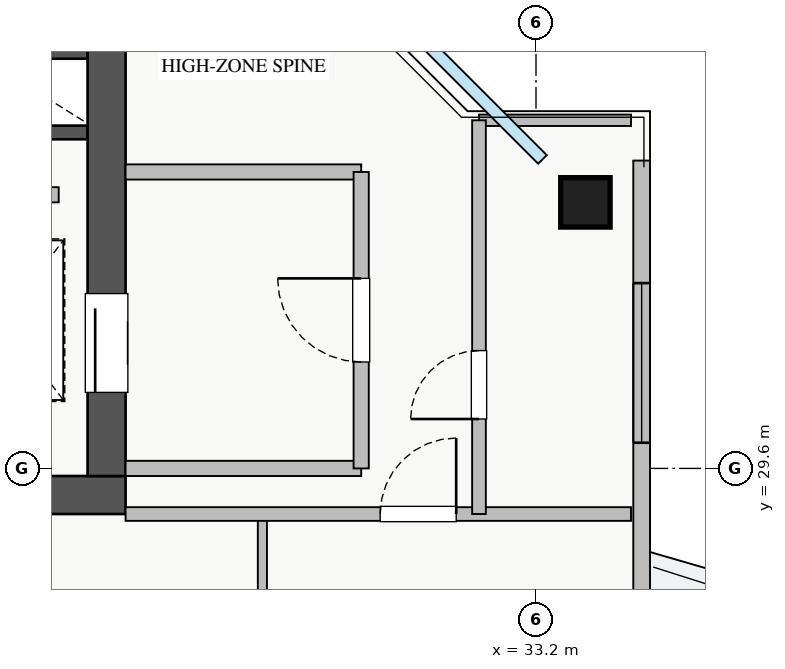
"""IFC4 building model, lengths in metres.
Left out: names, types, materials, properties, quantities, classifications, styles, units other than length and angle.
Written with IfcOpenShell. Run it as: python <this file> out.ifc"""

import sys

from ifc_helpers import new_model, si_unit, direction, frame, frame_2d, origin, origin_2d, place, context, subcontext, project, spatial, rectangle, extrude, source, transform, mapped, element, fill, save


model = new_model("IFC4")
c1 = context("Model", 3, precision=1e-05, world=origin(), true_north=direction((0.0, 1.0)))
c2 = subcontext(c1, "Body", "Model", "MODEL_VIEW")
j1 = project(units=[si_unit("LENGTHUNIT", "METRE"), si_unit("PLANEANGLEUNIT", "RADIAN")], contexts=[c1])
p1 = place(None, origin())
s1 = spatial("IfcSite", under=j1, at=p1, CompositionType="ELEMENT")
p2 = place(p1, origin())
s2 = spatial("IfcBuilding", under=s1, at=p2, CompositionType="ELEMENT")
p3 = place(p2, frame((0.0, 0.0, 250.25)))
s3 = spatial("IfcBuildingStorey", under=s2, at=p3, CompositionType="ELEMENT", Elevation=250.25)
for number, where, z_axis, x_axis in (
    (1, (25.8, 35.08, 0.0), (0.0, 0.0, 1.0), (1.0, 0.0, 0.0)),
    (2, (25.8, 34.02, 0.0), (0.0, 0.0, 1.0), (1.0, 0.0, 0.0)),
):
    element("IfcWall", number, at=place(p3, frame(where, z_axis=z_axis, x_axis=x_axis)), inside=s3, PredefinedType="SHEAR", context=c2, shape_type="SweptSolid", body=[
        extrude(rectangle(XDim=1.5, YDim=0.18, at=frame_2d((0.75, 0.0))), origin(), (0.0, 0.0, 1.0), 3.07),
    ])
p4 = place(p3, frame((10.2, 29.25, 0.0), z_axis=(0.0, 0.0, 1.0), x_axis=(1.0, 0.0, 0.0)))
e3 = element("IfcWall", 3, at=p4, inside=s3, PredefinedType="SHEAR", context=c2, shape_type="SweptSolid", body=[
    extrude(rectangle(XDim=17.6, YDim=0.5, at=frame_2d((8.8, 0.0))), origin(), (0.0, 0.0, 1.0), 3.25),
])
p5 = place(p3, frame((27.55, 29.5, 0.0), z_axis=(0.0, 0.0, 1.0), x_axis=(0.0, 1.0, 0.0)))
e4 = element("IfcWall", 4, at=p5, inside=s3, PredefinedType="SHEAR", context=c2, shape_type="SweptSolid", body=[
    extrude(rectangle(XDim=6.2, YDim=0.5, at=frame_2d((3.1, 0.0))), origin(), (0.0, 0.0, 1.0), 3.25),
])
p6 = place(p5, frame((1.1, 0.0, 0.0)))
e5 = element("IfcOpeningElement", 5, at=p6, cuts=e4, PredefinedType="OPENING", context=c2, shape_type="SweptSolid", body=[
    extrude(rectangle(XDim=1.3, YDim=2.05, at=frame_2d((0.65, 1.025))), frame((0.0, 0.26, 0.0), z_axis=(0.0, -1.0, 0.0), x_axis=(1.0, 0.0, 0.0)), (0.0, 0.0, 1.0), 0.52),
])
m1 = source(origin(), c2, "Body", "SweptSolid", [
    extrude(rectangle(XDim=0.65, YDim=0.65, at=origin_2d()), origin(), (0.0, 0.0, 1.0), 3.25),
])
p7 = place(p3, frame((33.85, 33.1, 0.0), z_axis=(0.0, 0.0, 1.0), x_axis=(1.0, 0.0, 0.0)))
e6 = element("IfcColumn", 6, at=p7, inside=s3, PredefinedType="COLUMN", context=c2, shape_type="MappedRepresentation", body=[
    mapped(m1, transform((0.0, 0.0, 0.0), x_axis=(1.0, 0.0, 0.0), y_axis=(0.0, 1.0, 0.0), z_axis=(0.0, 0.0, 1.0), scale=1.0)),
])
p8 = place(p3, frame((34.59, 12.35, 0.0), z_axis=(0.0, 0.0, 1.0), x_axis=(0.0, 1.0, 0.0)))
e7 = element("IfcWall", 7, at=p8, inside=s3, PredefinedType="STANDARD", context=c2, shape_type="SweptSolid", body=[
    extrude(rectangle(XDim=21.3, YDim=0.22, at=frame_2d((10.65, 0.0))), origin(), (0.0, 0.0, 1.0), 2.61),
])
p9 = place(p8, frame((11.5, 0.0, 0.0)))
e8 = element("IfcOpeningElement", 8, at=p9, cuts=e7, PredefinedType="OPENING", context=c2, shape_type="SweptSolid", body=[
    extrude(rectangle(XDim=1.2, YDim=2.1, at=frame_2d((0.6, 1.05))), frame((0.0, 0.12, 0.0), z_axis=(0.0, -1.0, 0.0), x_axis=(1.0, 0.0, 0.0)), (0.0, 0.0, 1.0), 0.24),
])
p10 = place(p8, frame((1.463, 0.0, 0.9)))
e9 = element("IfcOpeningElement", 9, at=p10, cuts=e7, PredefinedType="OPENING", context=c2, shape_type="SweptSolid", body=[
    extrude(rectangle(XDim=2.4, YDim=1.48, at=frame_2d((1.2, 0.74))), frame((0.0, 0.12, 0.0), z_axis=(0.0, -1.0, 0.0), x_axis=(1.0, 0.0, 0.0)), (0.0, 0.0, 1.0), 0.24),
])
p11 = place(p8, frame((17.588, 0.0, 0.9)))
e10 = element("IfcOpeningElement", 10, at=p11, cuts=e7, PredefinedType="OPENING", context=c2, shape_type="SweptSolid", body=[
    extrude(rectangle(XDim=2.1, YDim=1.48, at=frame_2d((1.05, 0.74))), frame((0.0, 0.12, 0.0), z_axis=(0.0, -1.0, 0.0), x_axis=(1.0, 0.0, 0.0)), (0.0, 0.0, 1.0), 0.24),
])
p12 = place(p8, frame((4.9, 0.0, 0.9)))
e11 = element("IfcOpeningElement", 11, at=p12, cuts=e7, PredefinedType="OPENING", context=c2, shape_type="SweptSolid", body=[
    extrude(rectangle(XDim=0.9, YDim=1.2, at=frame_2d((0.45, 0.6))), frame((0.0, 0.12, 0.0), z_axis=(0.0, -1.0, 0.0), x_axis=(1.0, 0.0, 0.0)), (0.0, 0.0, 1.0), 0.24),
])
p13 = place(p8, frame((9.685, 0.0, 0.9)))
e12 = element("IfcOpeningElement", 12, at=p13, cuts=e7, PredefinedType="OPENING", context=c2, shape_type="SweptSolid", body=[
    extrude(rectangle(XDim=0.9, YDim=1.2, at=frame_2d((0.45, 0.6))), frame((0.0, 0.12, 0.0), z_axis=(0.0, -1.0, 0.0), x_axis=(1.0, 0.0, 0.0)), (0.0, 0.0, 1.0), 0.24),
])
for number, where, z_axis, x_axis in (
    (13, (27.8, 29.6, 0.0), (0.0, 0.0, 1.0), (1.0, 0.0, 0.0)),
    (14, (27.8, 33.5, 0.0), (0.0, 0.0, 1.0), (1.0, 0.0, 0.0)),
):
    element("IfcWall", number, at=place(p3, frame(where, z_axis=z_axis, x_axis=x_axis)), inside=s3, PredefinedType="PARTITIONING", context=c2, shape_type="SweptSolid", body=[
        extrude(rectangle(XDim=3.1, YDim=0.2, at=frame_2d((1.55, 0.0))), origin(), (0.0, 0.0, 1.0), 3.07),
    ])
p14 = place(p3, frame((30.9, 29.6, 0.0), z_axis=(0.0, 0.0, 1.0), x_axis=(0.0, 1.0, 0.0)))
e15 = element("IfcWall", 15, at=p14, inside=s3, PredefinedType="PARTITIONING", context=c2, shape_type="SweptSolid", body=[
    extrude(rectangle(XDim=3.9, YDim=0.2, at=frame_2d((1.95, 0.0))), origin(), (0.0, 0.0, 1.0), 2.765),
])
p15 = place(p14, frame((1.4, 0.0, 0.0)))
e16 = element("IfcOpeningElement", 16, at=p15, cuts=e15, PredefinedType="OPENING", context=c2, shape_type="SweptSolid", body=[
    extrude(rectangle(XDim=1.1, YDim=2.05, at=frame_2d((0.55, 1.025))), frame((0.0, 0.11, 0.0), z_axis=(0.0, -1.0, 0.0), x_axis=(1.0, 0.0, 0.0)), (0.0, 0.0, 1.0), 0.22),
])
p16 = place(p3, frame((21.75, 33.2, 0.0), z_axis=(0.0, 0.0, 1.0), x_axis=(1.0, 0.0, 0.0)))
e17 = element("IfcWall", 17, at=p16, inside=s3, PredefinedType="PARTITIONING", context=c2, shape_type="SweptSolid", body=[
    extrude(rectangle(XDim=5.17, YDim=0.2, at=frame_2d((2.585, 0.0))), origin(), (0.0, 0.0, 1.0), 3.07),
])
p17 = place(p3, frame((29.6, 21.8, 0.0), z_axis=(0.0, 0.0, 1.0), x_axis=(0.0, 1.0, 0.0)))
e18 = element("IfcWall", 18, at=p17, inside=s3, PredefinedType="PLUMBINGWALL", context=c2, shape_type="SweptSolid", body=[
    extrude(rectangle(XDim=7.2, YDim=0.12, at=frame_2d((3.6, 0.0))), origin(), (0.0, 0.0, 1.0), 3.07),
])
p18 = place(p17, frame((1.035, 0.0, 0.0)))
e19 = element("IfcOpeningElement", 19, at=p18, cuts=e18, PredefinedType="OPENING", context=c2, shape_type="SweptSolid", body=[
    extrude(rectangle(XDim=0.85, YDim=2.05, at=frame_2d((0.425, 1.025))), frame((0.0, 0.07, 0.0), z_axis=(0.0, -1.0, 0.0), x_axis=(1.0, 0.0, 0.0)), (0.0, 0.0, 1.0), 0.14),
])
p19 = place(p17, frame((4.57, 0.0, 0.0)))
e20 = element("IfcOpeningElement", 20, at=p19, cuts=e18, PredefinedType="OPENING", context=c2, shape_type="SweptSolid", body=[
    extrude(rectangle(XDim=0.9, YDim=2.05, at=frame_2d((0.45, 1.025))), frame((0.0, 0.07, 0.0), z_axis=(0.0, -1.0, 0.0), x_axis=(1.0, 0.0, 0.0)), (0.0, 0.0, 1.0), 0.14),
])
p20 = place(p3, frame((27.8, 29.0, 0.0), z_axis=(0.0, 0.0, 1.0), x_axis=(1.0, 0.0, 0.0)))
e21 = element("IfcWall", 21, at=p20, inside=s3, PredefinedType="PARTITIONING", context=c2, shape_type="SweptSolid", body=[
    extrude(rectangle(XDim=6.65, YDim=0.18, at=frame_2d((3.325, 0.0))), origin(), (0.0, 0.0, 1.0), 3.07),
])
p21 = place(p20, frame((3.35, 0.0, 0.0)))
e22 = element("IfcOpeningElement", 22, at=p21, cuts=e21, PredefinedType="OPENING", context=c2, shape_type="SweptSolid", body=[
    extrude(rectangle(XDim=1.0, YDim=2.05, at=frame_2d((0.5, 1.025))), frame((0.0, 0.1, 0.0), z_axis=(0.0, -1.0, 0.0), x_axis=(1.0, 0.0, 0.0)), (0.0, 0.0, 1.0), 0.2),
])
p22 = place(p3, frame((32.45, 34.18, 0.0), z_axis=(0.0, 0.0, 1.0), x_axis=(1.0, 0.0, 0.0)))
e23 = element("IfcWall", 23, at=p22, inside=s3, PredefinedType="PARTITIONING", context=c2, shape_type="SweptSolid", body=[
    extrude(rectangle(XDim=2.0, YDim=0.15, at=frame_2d((1.0, 0.0))), origin(), (0.0, 0.0, 1.0), 3.07),
])
p23 = place(p3, frame((32.45, 29.0, 0.0), z_axis=(0.0, 0.0, 1.0), x_axis=(0.0, 1.0, 0.0)))
e24 = element("IfcWall", 24, at=p23, inside=s3, PredefinedType="PARTITIONING", context=c2, shape_type="SweptSolid", body=[
    extrude(rectangle(XDim=5.18, YDim=0.18, at=frame_2d((2.59, 0.0))), origin(), (0.0, 0.0, 1.0), 3.07),
])
p24 = place(p23, frame((1.25, 0.0, 0.0)))
e25 = element("IfcOpeningElement", 25, at=p24, cuts=e24, PredefinedType="OPENING", context=c2, shape_type="SweptSolid", body=[
    extrude(rectangle(XDim=0.9, YDim=2.05, at=frame_2d((0.45, 1.025))), frame((0.0, 0.1, 0.0), z_axis=(0.0, -1.0, 0.0), x_axis=(1.0, 0.0, 0.0)), (0.0, 0.0, 1.0), 0.2),
])
m2 = source(origin(), c2, "Body", "SweptSolid", [
    extrude(rectangle(XDim=2.1, YDim=1.48, at=frame_2d((1.05, 0.74))), frame((0.0, 0.03, 0.0), z_axis=(0.0, -1.0, 0.0), x_axis=(1.0, 0.0, 0.0)), (0.0, 0.0, 1.0), 0.06),
])
p25 = place(p11, origin())
e26 = element("IfcWindow", 26, at=p25, inside=s3, PartitioningType="TRIPLE_PANEL_VERTICAL", PredefinedType="WINDOW", context=c2, shape_type="MappedRepresentation", body=[
    mapped(m2, transform((0.0, 0.0, 0.0), x_axis=(1.0, 0.0, 0.0), y_axis=(0.0, 1.0, 0.0), z_axis=(0.0, 0.0, 1.0), scale=1.0)),
])
fill(e10, e26)
m3 = source(origin(), c2, "Body", "SweptSolid", [
    extrude(rectangle(XDim=1.3, YDim=2.05, at=frame_2d((0.65, 1.025))), frame((0.0, 0.025, 0.0), z_axis=(0.0, -1.0, 0.0), x_axis=(1.0, 0.0, 0.0)), (0.0, 0.0, 1.0), 0.05),
])
p26 = place(p6, origin())
e27 = element("IfcDoor", 27, at=p26, inside=s3, OperationType="SLIDING_TO_LEFT", PredefinedType="DOOR", context=c2, shape_type="MappedRepresentation", body=[
    mapped(m3, transform((0.0, 0.0, 0.0), x_axis=(1.0, 0.0, 0.0), y_axis=(0.0, 1.0, 0.0), z_axis=(0.0, 0.0, 1.0), scale=1.0)),
])
fill(e5, e27)
m4 = source(origin(), c2, "Body", "SweptSolid", [
    extrude(rectangle(XDim=1.1, YDim=2.05, at=frame_2d((0.55, 1.025))), frame((0.0, 0.025, 0.0), z_axis=(0.0, -1.0, 0.0), x_axis=(1.0, 0.0, 0.0)), (0.0, 0.0, 1.0), 0.05),
])
p27 = place(p15, origin())
e28 = element("IfcDoor", 28, at=p27, inside=s3, OperationType="SINGLE_SWING_RIGHT", PredefinedType="DOOR", context=c2, shape_type="MappedRepresentation", body=[
    mapped(m4, transform((0.0, 0.0, 0.0), x_axis=(1.0, 0.0, 0.0), y_axis=(0.0, 1.0, 0.0), z_axis=(0.0, 0.0, 1.0), scale=1.0)),
])
fill(e16, e28)
m5 = source(origin(), c2, "Body", "SweptSolid", [
    extrude(rectangle(XDim=1.0, YDim=2.05, at=frame_2d((0.5, 1.025))), frame((0.0, 0.025, 0.0), z_axis=(0.0, -1.0, 0.0), x_axis=(1.0, 0.0, 0.0)), (0.0, 0.0, 1.0), 0.05),
])
p28 = place(p21, origin())
e29 = element("IfcDoor", 29, at=p28, inside=s3, OperationType="SINGLE_SWING_RIGHT", PredefinedType="DOOR", context=c2, shape_type="MappedRepresentation", body=[
    mapped(m5, transform((0.0, 0.0, 0.0), x_axis=(1.0, 0.0, 0.0), y_axis=(0.0, 1.0, 0.0), z_axis=(0.0, 0.0, 1.0), scale=1.0)),
])
fill(e22, e29)
m6 = source(origin(), c2, "Body", "SweptSolid", [
    extrude(rectangle(XDim=0.9, YDim=2.05, at=frame_2d((0.45, 1.025))), frame((0.0, 0.025, 0.0), z_axis=(0.0, -1.0, 0.0), x_axis=(1.0, 0.0, 0.0)), (0.0, 0.0, 1.0), 0.05),
])
p29 = place(p24, origin())
e30 = element("IfcDoor", 30, at=p29, inside=s3, OperationType="SINGLE_SWING_LEFT", PredefinedType="DOOR", context=c2, shape_type="MappedRepresentation", body=[
    mapped(m6, transform((0.0, 0.0, 0.0), x_axis=(1.0, 0.0, 0.0), y_axis=(0.0, 1.0, 0.0), z_axis=(0.0, 0.0, 1.0), scale=1.0)),
])
fill(e25, e30)
save(model, sys.argv[1])
